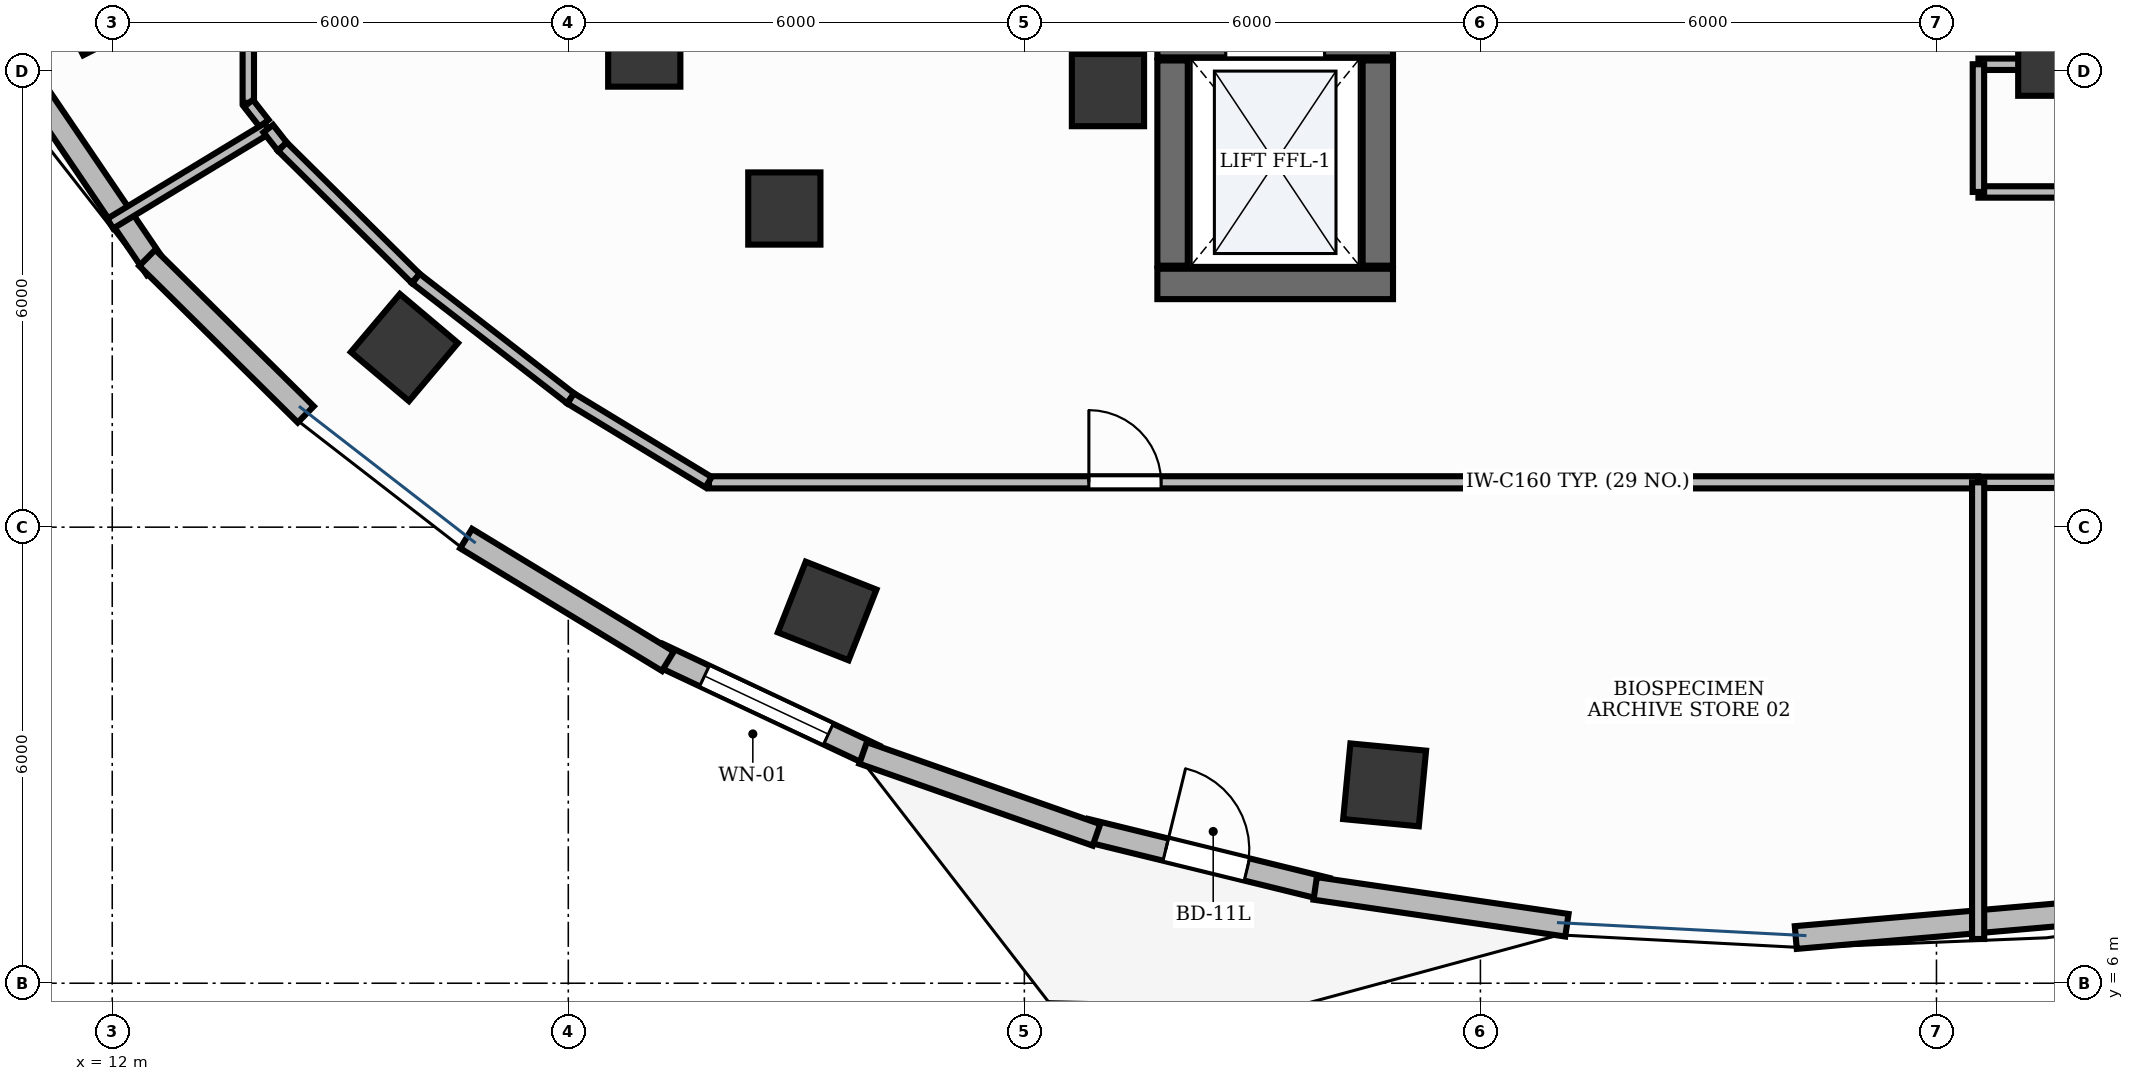
"""IFC4 building model, lengths in metres.
Left out: names, types, materials, properties, quantities, classifications, styles, units other than length and angle.
Written with IfcOpenShell. Run it as: python <this file> out.ifc"""

import sys

from ifc_helpers import new_model, si_unit, direction, frame, frame_2d, origin, origin_2d, place, context, subcontext, project, spatial, rectangle, extrude, element, fill, save


model = new_model("IFC4")
c1 = context("Model", 3, precision=1e-05, world=origin(), true_north=direction((0.0, 1.0)))
c2 = subcontext(c1, "Body", "Model", "MODEL_VIEW")
j1 = project(units=[si_unit("LENGTHUNIT", "METRE"), si_unit("PLANEANGLEUNIT", "RADIAN")], contexts=[c1])
p1 = place(None, origin())
s1 = spatial("IfcSite", under=j1, at=p1, CompositionType="ELEMENT")
p2 = place(p1, origin())
s2 = spatial("IfcBuilding", under=s1, at=p2, CompositionType="ELEMENT")
p3 = place(p2, frame((0.0, 0.0, 179.4)))
s3 = spatial("IfcBuildingStorey", under=s2, at=p3, CompositionType="ELEMENT", Elevation=179.4)
p4 = place(p3, frame((25.75, 15.2, 0.0), z_axis=(0.0, 0.0, 1.0), x_axis=(1.0, 0.0, 0.0)))
e1 = element("IfcWall", 1, at=p4, inside=s3, PredefinedType="SHEAR", context=c2, shape_type="SweptSolid", body=[
    extrude(rectangle(XDim=3.1, YDim=0.4, at=frame_2d((1.55, 0.0))), origin(), (0.0, 0.0, 1.0), 3.9),
])
p5 = place(p3, frame((25.75, 18.38, 0.0), z_axis=(0.0, 0.0, 1.0), x_axis=(1.0, 0.0, 0.0)))
e2 = element("IfcWall", 2, at=p5, inside=s3, PredefinedType="SHEAR", context=c2, shape_type="SweptSolid", body=[
    extrude(rectangle(XDim=3.1, YDim=0.4, at=frame_2d((1.55, 0.0))), origin(), (0.0, 0.0, 1.0), 3.9),
])
p6 = place(p5, frame((0.9, 0.0, 0.0)))
e3 = element("IfcOpeningElement", 3, at=p6, cuts=e2, PredefinedType="OPENING", context=c2, shape_type="SweptSolid", body=[
    extrude(rectangle(XDim=1.3, YDim=2.2, at=frame_2d((0.65, 1.1))), frame((0.0, 0.215, 0.0), z_axis=(0.0, -1.0, 0.0), x_axis=(1.0, 0.0, 0.0)), (0.0, 0.0, 1.0), 0.43),
])
for number, where, z_axis, x_axis in (
    (4, (25.95, 15.44, 0.0), (0.0, 0.0, 1.0), (0.0, 1.0, 0.0)),
    (5, (28.65, 15.44, 0.0), (0.0, 0.0, 1.0), (0.0, 1.0, 0.0)),
):
    element("IfcWall", number, at=place(p3, frame(where, z_axis=z_axis, x_axis=x_axis)), inside=s3, PredefinedType="SHEAR", context=c2, shape_type="SweptSolid", body=[
        extrude(rectangle(XDim=2.7, YDim=0.4, at=frame_2d((1.35, 0.0))), origin(), (0.0, 0.0, 1.0), 3.9),
    ])
for number, where, z_axis, x_axis in (
    (6, (25.1, 17.75, -0.0), (0.0, 0.0, 1.0), (1.0, 0.0, 0.0)),
    (7, (37.55, 18.15, -0.0), (0.0, 0.0, 1.0), (1.0, 0.0, 0.0)),
):
    element("IfcColumn", number, at=place(p3, frame(where, z_axis=z_axis, x_axis=x_axis)), inside=s3, PredefinedType="PILASTER", context=c2, shape_type="SweptSolid", body=[
        extrude(rectangle(XDim=0.95, YDim=0.95, at=origin_2d()), origin(), (0.0, 0.0, 1.0), 3.901),
    ])
p7 = place(p3, frame((11.838, 18.881, -0.0), z_axis=(0.0, 0.0, 1.0), x_axis=(-0.453057191132, 0.891481453292, 0.0)))
e8 = element("IfcColumn", 8, at=p7, inside=s3, PredefinedType="COLUMN", context=c2, shape_type="SweptSolid", body=[
    extrude(rectangle(XDim=1.0, YDim=1.0, at=origin_2d()), origin(), (0.0, 0.0, 1.0), 3.901),
])
p8 = place(p3, frame((19.0, 18.27, -0.0), z_axis=(0.0, 0.0, 1.0), x_axis=(1.0, 0.0, 0.0)))
e9 = element("IfcColumn", 9, at=p8, inside=s3, PredefinedType="COLUMN", context=c2, shape_type="SweptSolid", body=[
    extrude(rectangle(XDim=0.95, YDim=0.95, at=origin_2d()), origin(), (0.0, 0.0, 1.0), 3.901),
])
p9 = place(p3, frame((15.844, 14.363, -0.0), z_axis=(0.0, 0.0, 1.0), x_axis=(-0.764246456939, 0.644924300253, 0.0)))
e10 = element("IfcColumn", 10, at=p9, inside=s3, PredefinedType="COLUMN", context=c2, shape_type="SweptSolid", body=[
    extrude(rectangle(XDim=1.0, YDim=1.0, at=origin_2d()), origin(), (0.0, 0.0, 1.0), 3.901),
])
p10 = place(p3, frame((20.842, 16.192, -0.0), z_axis=(0.0, 0.0, 1.0), x_axis=(1.0, 0.0, 0.0)))
e11 = element("IfcColumn", 11, at=p10, inside=s3, PredefinedType="COLUMN", context=c2, shape_type="SweptSolid", body=[
    extrude(rectangle(XDim=0.95, YDim=0.95, at=origin_2d()), origin(), (0.0, 0.0, 1.0), 3.901),
])
for number, where, z_axis, x_axis in (
    (12, (21.406, 10.897, -0.0), (0.0, 0.0, 1.0), (-0.93, 0.367, 0.0)),
    (13, (28.74, 8.61, -0.0), (0.0, 0.0, 1.0), (-0.995, 0.095, 0.0)),
):
    element("IfcColumn", number, at=place(p3, frame(where, z_axis=z_axis, x_axis=x_axis)), inside=s3, PredefinedType="COLUMN", context=c2, shape_type="SweptSolid", body=[
        extrude(rectangle(XDim=1.0, YDim=1.0, at=origin_2d()), origin(), (0.0, 0.0, 1.0), 3.901),
    ])
p11 = place(p3, frame((19.183, 10.329, 0.0), z_axis=(0.0, 0.0, 1.0), x_axis=(0.905013842092, -0.425382117186, 0.0)))
e14 = element("IfcWall", 14, at=p11, inside=s3, PredefinedType="STANDARD", context=c2, shape_type="SweptSolid", body=[
    extrude(rectangle(XDim=3.146, YDim=0.3, at=frame_2d((1.573, 0.0))), origin(), (0.0, 0.0, 1.0), 3.9),
])
p12 = place(p11, frame((0.673, 0.0, 0.9)))
e15 = element("IfcOpeningElement", 15, at=p12, cuts=e14, PredefinedType="OPENING", context=c2, shape_type="SweptSolid", body=[
    extrude(rectangle(XDim=1.8, YDim=2.1, at=frame_2d((0.9, 1.05))), frame((0.0, 0.165, 0.0), z_axis=(0.0, -1.0, 0.0), x_axis=(1.0, 0.0, 0.0)), (0.0, 0.0, 1.0), 0.33),
])
p13 = place(p3, frame((24.807, 8.016, 0.0), z_axis=(0.0, 0.0, 1.0), x_axis=(0.971312804689, -0.237805457142, 0.0)))
e16 = element("IfcWall", 16, at=p13, inside=s3, PredefinedType="STANDARD", context=c2, shape_type="SweptSolid", body=[
    extrude(rectangle(XDim=3.269, YDim=0.3, at=frame_2d((1.634, 0.0))), origin(), (0.0, 0.0, 1.0), 3.9),
])
p14 = place(p13, frame((1.084, 0.0, 0.0)))
e17 = element("IfcOpeningElement", 17, at=p14, cuts=e16, PredefinedType="OPENING", context=c2, shape_type="SweptSolid", body=[
    extrude(rectangle(XDim=1.1, YDim=2.15, at=frame_2d((0.55, 1.075))), frame((0.0, 0.165, 0.0), z_axis=(0.0, -1.0, 0.0), x_axis=(1.0, 0.0, 0.0)), (0.0, 0.0, 1.0), 0.33),
])
p15 = place(p3, frame((9.526, 19.898, 0.0), z_axis=(0.0, 0.0, 1.0), x_axis=(0.561663900064, -0.827365495634, 0.0)))
e18 = element("IfcWall", 18, at=p15, inside=s3, PredefinedType="STANDARD", context=c2, shape_type="SweptSolid", body=[
    extrude(rectangle(XDim=5.438, YDim=0.3, at=frame_2d((2.719, 0.0))), origin(), (0.0, 0.0, 1.0), 3.47),
])
p16 = place(p3, frame((12.461, 15.543, 0.0), z_axis=(0.0, 0.0, 1.0), x_axis=(0.711508162911, -0.702677830951, 0.0)))
e19 = element("IfcWall", 19, at=p16, inside=s3, PredefinedType="STANDARD", context=c2, shape_type="SweptSolid", body=[
    extrude(rectangle(XDim=2.931, YDim=0.3, at=frame_2d((1.465, 0.0))), origin(), (0.0, 0.0, 1.0), 3.47),
])
p17 = place(p3, frame((16.656, 11.85, 0.0), z_axis=(0.0, 0.0, 1.0), x_axis=(0.854580756668, -0.519318524928, 0.0)))
e20 = element("IfcWall", 20, at=p17, inside=s3, PredefinedType="STANDARD", context=c2, shape_type="SweptSolid", body=[
    extrude(rectangle(XDim=3.106, YDim=0.3, at=frame_2d((1.553, 0.0))), origin(), (0.0, 0.0, 1.0), 3.9),
])
p18 = place(p3, frame((21.878, 9.03, 0.0), z_axis=(0.0, 0.0, 1.0), x_axis=(0.94352100271, -0.331312718509, 0.0)))
e21 = element("IfcWall", 21, at=p18, inside=s3, PredefinedType="STANDARD", context=c2, shape_type="SweptSolid", body=[
    extrude(rectangle(XDim=3.254, YDim=0.3, at=frame_2d((1.627, 0.0))), origin(), (0.0, 0.0, 1.0), 3.9),
])
p19 = place(p3, frame((27.826, 7.247, 0.0), z_axis=(0.0, 0.0, 1.0), x_axis=(0.98945927954, -0.144811374319, 0.0)))
e22 = element("IfcWall", 22, at=p19, inside=s3, PredefinedType="STANDARD", context=c2, shape_type="SweptSolid", body=[
    extrude(rectangle(XDim=3.346, YDim=0.3, at=frame_2d((1.673, 0.0))), origin(), (0.0, 0.0, 1.0), 3.9),
])
p20 = place(p3, frame((34.149, 6.601, 0.0), z_axis=(0.0, 0.0, 1.0), x_axis=(0.996255675021, 0.086455942472, 0.0)))
e23 = element("IfcWall", 23, at=p20, inside=s3, PredefinedType="STANDARD", context=c2, shape_type="SweptSolid", body=[
    extrude(rectangle(XDim=6.551, YDim=0.3, at=frame_2d((3.276, 0.0))), origin(), (0.0, 0.0, 1.0), 3.9),
])
p21 = place(p3, frame((13.79, 28.39, 0.0), z_axis=(0.0, 0.0, 1.0), x_axis=(0.0, -1.0, 0.0)))
e24 = element("IfcWall", 24, at=p21, inside=s3, PredefinedType="PARTITIONING", context=c2, shape_type="SweptSolid", body=[
    extrude(rectangle(XDim=10.807, YDim=0.15, at=frame_2d((5.404, 0.0))), origin(), (0.0, 0.0, 1.0), 2.91),
])
p22 = place(p21, frame((3.192, 0.0, 0.0)))
e25 = element("IfcOpeningElement", 25, at=p22, cuts=e24, PredefinedType="OPENING", context=c2, shape_type="SweptSolid", body=[
    extrude(rectangle(XDim=0.95, YDim=2.15, at=frame_2d((0.475, 1.075))), frame((0.0, 0.09, 0.0), z_axis=(0.0, -1.0, 0.0), x_axis=(1.0, 0.0, 0.0)), (0.0, 0.0, 1.0), 0.18),
])
p23 = place(p3, frame((19.85, 12.59, 0.0), z_axis=(0.0, 0.0, 1.0), x_axis=(1.0, 0.0, 0.0)))
e26 = element("IfcWall", 26, at=p23, inside=s3, PredefinedType="PARTITIONING", context=c2, shape_type="SweptSolid", body=[
    extrude(rectangle(XDim=16.698, YDim=0.16, at=frame_2d((8.349, 0.0))), origin(), (0.0, 0.0, 1.0), 2.91),
])
p24 = place(p23, frame((4.999, 0.0, 0.0)))
e27 = element("IfcOpeningElement", 27, at=p24, cuts=e26, PredefinedType="OPENING", context=c2, shape_type="SweptSolid", body=[
    extrude(rectangle(XDim=0.95, YDim=2.15, at=frame_2d((0.475, 1.075))), frame((0.0, 0.095, 0.0), z_axis=(0.0, -1.0, 0.0), x_axis=(1.0, 0.0, 0.0)), (0.0, 0.0, 1.0), 0.19),
])
p25 = place(p3, frame((36.558, 12.59, 0.0), z_axis=(0.0, 0.0, 1.0), x_axis=(1.0, 0.0, 0.0)))
e28 = element("IfcWall", 28, at=p25, inside=s3, PredefinedType="PARTITIONING", context=c2, shape_type="SweptSolid", body=[
    extrude(rectangle(XDim=7.942, YDim=0.15, at=frame_2d((3.971, 0.0))), origin(), (0.0, 0.0, 1.0), 2.91),
])
p26 = place(p25, frame((6.752, 0.0, 0.0)))
e29 = element("IfcOpeningElement", 29, at=p26, cuts=e28, PredefinedType="OPENING", context=c2, shape_type="SweptSolid", body=[
    extrude(rectangle(XDim=0.95, YDim=2.15, at=frame_2d((0.475, 1.075))), frame((0.0, 0.09, 0.0), z_axis=(0.0, -1.0, 0.0), x_axis=(1.0, 0.0, 0.0)), (0.0, 0.0, 1.0), 0.18),
])
p27 = place(p3, frame((44.5, 16.41, 0.0), z_axis=(0.0, 0.0, 1.0), x_axis=(-1.0, 0.0, 0.0)))
e30 = element("IfcWall", 30, at=p27, inside=s3, PredefinedType="PARTITIONING", context=c2, shape_type="SweptSolid", body=[
    extrude(rectangle(XDim=7.948, YDim=0.15, at=frame_2d((3.974, 0.0))), origin(), (0.0, 0.0, 1.0), 2.91),
])
p28 = place(p27, frame((4.449, 0.0, 0.0)))
e31 = element("IfcOpeningElement", 31, at=p28, cuts=e30, PredefinedType="OPENING", context=c2, shape_type="SweptSolid", body=[
    extrude(rectangle(XDim=0.95, YDim=2.15, at=frame_2d((0.475, 1.075))), frame((0.0, 0.09, 0.0), z_axis=(0.0, -1.0, 0.0), x_axis=(1.0, 0.0, 0.0)), (0.0, 0.0, 1.0), 0.18),
])
p29 = place(p3, frame((13.792, 17.576, 0.0), z_axis=(0.0, 0.0, 1.0), x_axis=(0.61611141045, -0.78765901881, 0.0)))
e32 = element("IfcWall", 32, at=p29, inside=s3, PredefinedType="PARTITIONING", context=c2, shape_type="SweptSolid", body=[
    extrude(rectangle(XDim=0.334, YDim=0.15, at=frame_2d((0.167, 0.0))), origin(), (0.0, 0.0, 1.0), 2.91),
])
p30 = place(p3, frame((14.046, 17.251, 0.0), z_axis=(0.0, 0.0, 1.0), x_axis=(-0.854959737725, -0.518694367494, 0.0)))
e33 = element("IfcWall", 33, at=p30, inside=s3, PredefinedType="PARTITIONING", context=c2, shape_type="SweptSolid", body=[
    extrude(rectangle(XDim=2.425, YDim=0.15, at=frame_2d((1.212, 0.0))), origin(), (0.0, 0.0, 1.0), 2.91),
])
p31 = place(p3, frame((14.052, 17.243, 0.0), z_axis=(0.0, 0.0, 1.0), x_axis=(0.615628260214, -0.788036702969, 0.0)))
e34 = element("IfcWall", 34, at=p31, inside=s3, PredefinedType="PARTITIONING", context=c2, shape_type="SweptSolid", body=[
    extrude(rectangle(XDim=0.3, YDim=0.16, at=frame_2d((0.15, 0.0))), origin(), (0.0, 0.0, 1.0), 2.91),
])
p32 = place(p3, frame((14.238, 17.006, 0.0), z_axis=(0.0, 0.0, 1.0), x_axis=(0.711447157113, -0.702739598027, 0.0)))
e35 = element("IfcWall", 35, at=p32, inside=s3, PredefinedType="PARTITIONING", context=c2, shape_type="SweptSolid", body=[
    extrude(rectangle(XDim=2.467, YDim=0.16, at=frame_2d((1.234, 0.0))), origin(), (0.0, 0.0, 1.0), 2.91),
])
p33 = place(p3, frame((15.995, 15.271, 0.0), z_axis=(0.0, 0.0, 1.0), x_axis=(0.790550458789, -0.61239690733, 0.0)))
e36 = element("IfcWall", 36, at=p33, inside=s3, PredefinedType="PARTITIONING", context=c2, shape_type="SweptSolid", body=[
    extrude(rectangle(XDim=2.575, YDim=0.16, at=frame_2d((1.288, 0.0))), origin(), (0.0, 0.0, 1.0), 2.91),
])
p34 = place(p3, frame((18.031, 13.694, 0.0), z_axis=(0.0, 0.0, 1.0), x_axis=(0.85454497186, -0.51937740716, 0.0)))
e37 = element("IfcWall", 37, at=p34, inside=s3, PredefinedType="PARTITIONING", context=c2, shape_type="SweptSolid", body=[
    extrude(rectangle(XDim=2.122, YDim=0.16, at=frame_2d((1.061, 0.0))), origin(), (0.0, 0.0, 1.0), 2.91),
])
p35 = place(p3, frame((36.548, 12.59, 0.0), z_axis=(0.0, 0.0, 1.0), x_axis=(0.0, -1.0, 0.0)))
e38 = element("IfcWall", 38, at=p35, inside=s3, PredefinedType="PARTITIONING", context=c2, shape_type="SweptSolid", body=[
    extrude(rectangle(XDim=6.008, YDim=0.16, at=frame_2d((3.004, 0.0))), origin(), (0.0, 0.0, 1.0), 2.91),
])
p36 = place(p3, frame((36.552, 18.09, 0.0), z_axis=(0.0, 0.0, 1.0), x_axis=(1.0, 0.0, 0.0)))
e39 = element("IfcWall", 39, at=p36, inside=s3, PredefinedType="PARTITIONING", context=c2, shape_type="SweptSolid", body=[
    extrude(rectangle(XDim=0.798, YDim=0.15, at=frame_2d((0.399, 0.0))), origin(), (0.0, 0.0, 1.0), 2.91),
])
p37 = place(p3, frame((37.36, 18.1, 0.0), z_axis=(0.0, 0.0, 1.0), x_axis=(0.0, 1.0, 0.0)))
e40 = element("IfcWall", 40, at=p37, inside=s3, PredefinedType="PARTITIONING", context=c2, shape_type="SweptSolid", body=[
    extrude(rectangle(XDim=7.248, YDim=0.15, at=frame_2d((3.624, 0.0))), origin(), (0.0, 0.0, 1.0), 2.91),
])
p38 = place(p3, frame((36.552, 16.41, 0.0), z_axis=(0.0, 0.0, 1.0), x_axis=(0.0, 1.0, 0.0)))
e41 = element("IfcWall", 41, at=p38, inside=s3, PredefinedType="PARTITIONING", context=c2, shape_type="SweptSolid", body=[
    extrude(rectangle(XDim=1.68, YDim=0.15, at=frame_2d((0.84, 0.0))), origin(), (0.0, 0.0, 1.0), 2.91),
])
p39 = place(p12, origin())
e42 = element("IfcWindow", 42, at=p39, inside=s3, PartitioningType="SINGLE_PANEL", PredefinedType="WINDOW", context=c2, shape_type="SweptSolid", body=[
    extrude(rectangle(XDim=1.8, YDim=2.1, at=frame_2d((0.9, 1.05))), frame((0.0, 0.03, 0.0), z_axis=(0.0, -1.0, 0.0), x_axis=(1.0, 0.0, 0.0)), (0.0, 0.0, 1.0), 0.06),
])
fill(e15, e42)
p40 = place(p14, origin())
e43 = element("IfcDoor", 43, at=p40, inside=s3, OperationType="SINGLE_SWING_LEFT", PredefinedType="DOOR", context=c2, shape_type="SweptSolid", body=[
    extrude(rectangle(XDim=1.1, YDim=2.15, at=frame_2d((0.55, 1.075))), frame((0.0, 0.025, 0.0), z_axis=(0.0, -1.0, 0.0), x_axis=(1.0, 0.0, 0.0)), (0.0, 0.0, 1.0), 0.05),
])
fill(e17, e43)
p41 = place(p24, origin())
e44 = element("IfcDoor", 44, at=p41, inside=s3, OperationType="SINGLE_SWING_LEFT", PredefinedType="DOOR", context=c2, shape_type="SweptSolid", body=[
    extrude(rectangle(XDim=0.95, YDim=2.15, at=frame_2d((0.475, 1.075))), frame((0.0, 0.025, 0.0), z_axis=(0.0, -1.0, 0.0), x_axis=(1.0, 0.0, 0.0)), (0.0, 0.0, 1.0), 0.05),
])
fill(e27, e44)
save(model, sys.argv[1])
